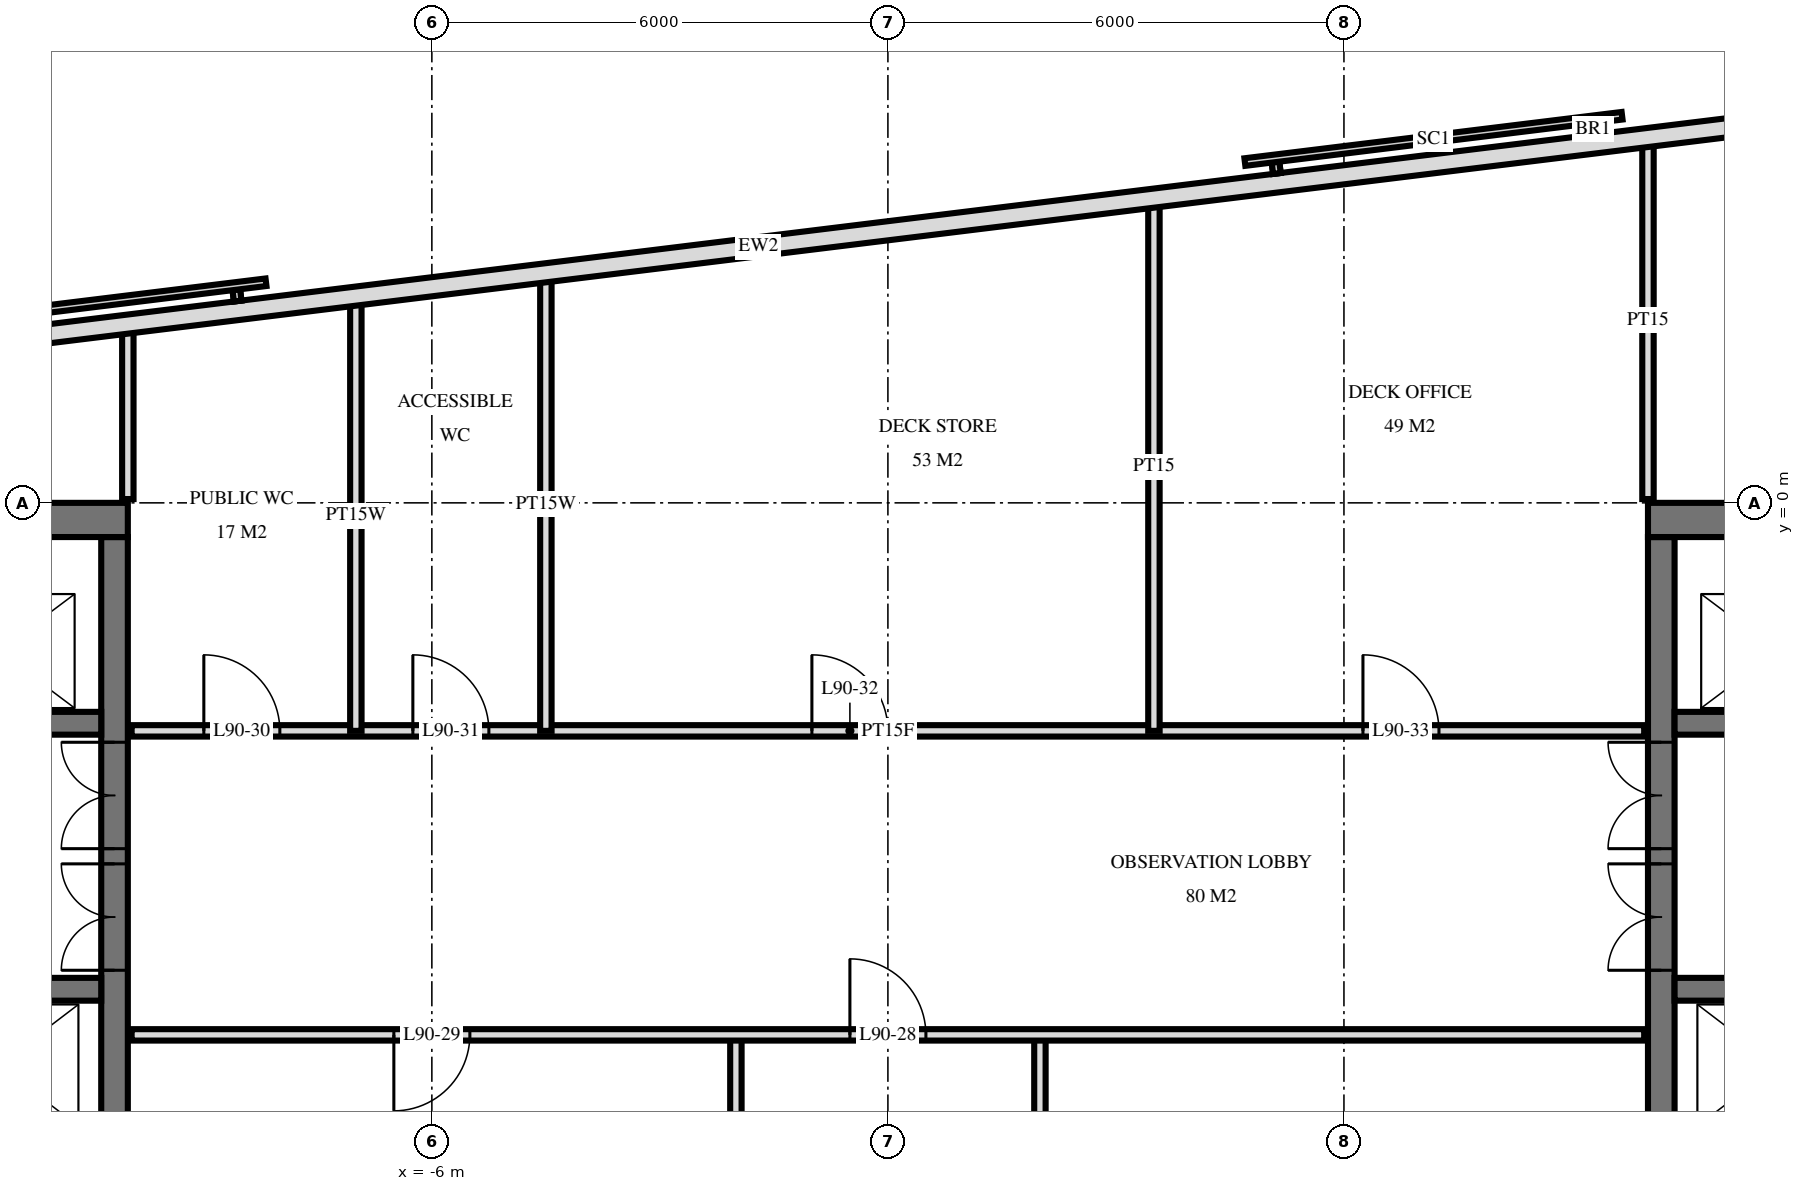
"""IFC4 building model, lengths in metres.
Left out: names, types, materials, properties, quantities, classifications, styles, units other than length and angle.
Written with IfcOpenShell. Run it as: python <this file> out.ifc"""

import sys

from ifc_helpers import new_model, si_unit, direction, frame, frame_2d, origin, place, context, subcontext, project, spatial, rectangle, extrude, element, fill, save


model = new_model("IFC4")
c1 = context("Model", 3, precision=1e-05, world=origin(), true_north=direction((0.0, 1.0)))
c2 = subcontext(c1, "Body", "Model", "MODEL_VIEW")
j1 = project(units=[si_unit("LENGTHUNIT", "METRE"), si_unit("PLANEANGLEUNIT", "RADIAN")], contexts=[c1])
p1 = place(None, origin())
s1 = spatial("IfcSite", under=j1, at=p1, CompositionType="ELEMENT")
p2 = place(p1, origin())
s2 = spatial("IfcBuilding", under=s1, at=p2, CompositionType="ELEMENT")
p3 = place(p2, frame((0.0, 0.0, 342.6)))
s3 = spatial("IfcBuildingStorey", under=s2, at=p3, CompositionType="ELEMENT", Elevation=342.6)
p4 = place(p3, frame((-19.5, -0.225, 0.0), z_axis=(0.0, 0.0, 1.0), x_axis=(1.0, 0.0, 0.0)))
e1 = element("IfcWall", 1, at=p4, inside=s3, PredefinedType="SHEAR", context=c2, shape_type="SweptSolid", body=[
    extrude(rectangle(XDim=9.5, YDim=0.45, at=frame_2d((4.75, 0.0))), origin(), (0.0, 0.0, 1.0), 4.0),
])
p5 = place(p3, frame((-10.175, -14.55, 0.0), z_axis=(0.0, 0.0, 1.0), x_axis=(0.0, 1.0, 0.0)))
e2 = element("IfcWall", 2, at=p5, inside=s3, PredefinedType="SHEAR", context=c2, shape_type="SweptSolid", body=[
    extrude(rectangle(XDim=14.1, YDim=0.35, at=frame_2d((7.05, 0.0))), origin(), (0.0, 0.0, 1.0), 4.0),
])
p6 = place(p5, frame((8.4, 0.0, 0.0)))
e3 = element("IfcOpeningElement", 3, at=p6, cuts=e2, PredefinedType="OPENING", context=c2, shape_type="SweptSolid", body=[
    extrude(rectangle(XDim=1.4, YDim=2.4, at=frame_2d((0.7, 1.2))), frame((0.0, 0.185, 0.0), z_axis=(0.0, -1.0, 0.0), x_axis=(1.0, 0.0, 0.0)), (0.0, 0.0, 1.0), 0.37),
])
p7 = place(p5, frame((10.0, 0.0, 0.0)))
e4 = element("IfcOpeningElement", 4, at=p7, cuts=e2, PredefinedType="OPENING", context=c2, shape_type="SweptSolid", body=[
    extrude(rectangle(XDim=1.4, YDim=2.4, at=frame_2d((0.7, 1.2))), frame((0.0, 0.185, 0.0), z_axis=(0.0, -1.0, 0.0), x_axis=(1.0, 0.0, 0.0)), (0.0, 0.0, 1.0), 0.37),
])
p8 = place(p5, frame((4.0, 0.0, 0.0)))
e5 = element("IfcOpeningElement", 5, at=p8, cuts=e2, PredefinedType="OPENING", context=c2, shape_type="SweptSolid", body=[
    extrude(rectangle(XDim=1.2, YDim=2.1, at=frame_2d((0.6, 1.05))), frame((0.0, 0.185, 0.0), z_axis=(0.0, -1.0, 0.0), x_axis=(1.0, 0.0, 0.0)), (0.0, 0.0, 1.0), 0.37),
])
p9 = place(p3, frame((-19.05, -2.9, 0.0), z_axis=(0.0, 0.0, 1.0), x_axis=(1.0, 0.0, 0.0)))
e6 = element("IfcWall", 6, at=p9, inside=s3, PredefinedType="SHEAR", context=c2, shape_type="SweptSolid", body=[
    extrude(rectangle(XDim=8.7, YDim=0.3, at=frame_2d((4.35, 0.0))), origin(), (0.0, 0.0, 1.0), 4.0),
])
p10 = place(p9, frame((6.8, 0.0, 0.0)))
e7 = element("IfcOpeningElement", 7, at=p10, cuts=e6, PredefinedType="OPENING", context=c2, shape_type="SweptSolid", body=[
    extrude(rectangle(XDim=1.1, YDim=2.1, at=frame_2d((0.55, 1.05))), frame((0.0, 0.16, 0.0), z_axis=(0.0, -1.0, 0.0), x_axis=(1.0, 0.0, 0.0)), (0.0, 0.0, 1.0), 0.32),
])
p11 = place(p9, frame((3.8, 0.0, 0.0)))
e8 = element("IfcOpeningElement", 8, at=p11, cuts=e6, PredefinedType="OPENING", context=c2, shape_type="SweptSolid", body=[
    extrude(rectangle(XDim=1.1, YDim=2.1, at=frame_2d((0.55, 1.05))), frame((0.0, 0.16, 0.0), z_axis=(0.0, -1.0, 0.0), x_axis=(1.0, 0.0, 0.0)), (0.0, 0.0, 1.0), 0.32),
])
p12 = place(p9, frame((1.863, 0.0, 0.0)))
e9 = element("IfcOpeningElement", 9, at=p12, cuts=e6, PredefinedType="OPENING", context=c2, shape_type="SweptSolid", body=[
    extrude(rectangle(XDim=0.9, YDim=2.1, at=frame_2d((0.45, 1.05))), frame((0.0, 0.16, 0.0), z_axis=(0.0, -1.0, 0.0), x_axis=(1.0, 0.0, 0.0)), (0.0, 0.0, 1.0), 0.32),
])
p13 = place(p9, frame((0.438, 0.0, 0.0)))
e10 = element("IfcOpeningElement", 10, at=p13, cuts=e6, PredefinedType="OPENING", context=c2, shape_type="SweptSolid", body=[
    extrude(rectangle(XDim=0.9, YDim=2.1, at=frame_2d((0.45, 1.05))), frame((0.0, 0.16, 0.0), z_axis=(0.0, -1.0, 0.0), x_axis=(1.0, 0.0, 0.0)), (0.0, 0.0, 1.0), 0.32),
])
p14 = place(p3, frame((-19.05, -6.4, 0.0), z_axis=(0.0, 0.0, 1.0), x_axis=(1.0, 0.0, 0.0)))
e11 = element("IfcWall", 11, at=p14, inside=s3, PredefinedType="SHEAR", context=c2, shape_type="SweptSolid", body=[
    extrude(rectangle(XDim=8.7, YDim=0.3, at=frame_2d((4.35, 0.0))), origin(), (0.0, 0.0, 1.0), 4.0),
])
p15 = place(p14, frame((6.8, 0.0, 0.0)))
e12 = element("IfcOpeningElement", 12, at=p15, cuts=e11, PredefinedType="OPENING", context=c2, shape_type="SweptSolid", body=[
    extrude(rectangle(XDim=1.1, YDim=2.1, at=frame_2d((0.55, 1.05))), frame((0.0, 0.16, 0.0), z_axis=(0.0, -1.0, 0.0), x_axis=(1.0, 0.0, 0.0)), (0.0, 0.0, 1.0), 0.32),
])
p16 = place(p14, frame((0.8, 0.0, 0.0)))
e13 = element("IfcOpeningElement", 13, at=p16, cuts=e11, PredefinedType="OPENING", context=c2, shape_type="SweptSolid", body=[
    extrude(rectangle(XDim=1.1, YDim=2.1, at=frame_2d((0.55, 1.05))), frame((0.0, 0.16, 0.0), z_axis=(0.0, -1.0, 0.0), x_axis=(1.0, 0.0, 0.0)), (0.0, 0.0, 1.0), 0.32),
])
p17 = place(p3, frame((10.0, -0.225, 0.0), z_axis=(0.0, 0.0, 1.0), x_axis=(1.0, 0.0, 0.0)))
e14 = element("IfcWall", 14, at=p17, inside=s3, PredefinedType="SHEAR", context=c2, shape_type="SweptSolid", body=[
    extrude(rectangle(XDim=9.5, YDim=0.45, at=frame_2d((4.75, 0.0))), origin(), (0.0, 0.0, 1.0), 4.0),
])
p18 = place(p3, frame((10.175, -14.55, 0.0), z_axis=(0.0, 0.0, 1.0), x_axis=(0.0, 1.0, 0.0)))
e15 = element("IfcWall", 15, at=p18, inside=s3, PredefinedType="SHEAR", context=c2, shape_type="SweptSolid", body=[
    extrude(rectangle(XDim=14.1, YDim=0.35, at=frame_2d((7.05, 0.0))), origin(), (0.0, 0.0, 1.0), 4.0),
])
p19 = place(p18, frame((8.4, 0.0, 0.0)))
e16 = element("IfcOpeningElement", 16, at=p19, cuts=e15, PredefinedType="OPENING", context=c2, shape_type="SweptSolid", body=[
    extrude(rectangle(XDim=1.4, YDim=2.4, at=frame_2d((0.7, 1.2))), frame((0.0, 0.185, 0.0), z_axis=(0.0, -1.0, 0.0), x_axis=(1.0, 0.0, 0.0)), (0.0, 0.0, 1.0), 0.37),
])
p20 = place(p18, frame((10.0, 0.0, 0.0)))
e17 = element("IfcOpeningElement", 17, at=p20, cuts=e15, PredefinedType="OPENING", context=c2, shape_type="SweptSolid", body=[
    extrude(rectangle(XDim=1.4, YDim=2.4, at=frame_2d((0.7, 1.2))), frame((0.0, 0.185, 0.0), z_axis=(0.0, -1.0, 0.0), x_axis=(1.0, 0.0, 0.0)), (0.0, 0.0, 1.0), 0.37),
])
p21 = place(p18, frame((4.0, 0.0, 0.0)))
e18 = element("IfcOpeningElement", 18, at=p21, cuts=e15, PredefinedType="OPENING", context=c2, shape_type="SweptSolid", body=[
    extrude(rectangle(XDim=1.2, YDim=2.1, at=frame_2d((0.6, 1.05))), frame((0.0, 0.185, 0.0), z_axis=(0.0, -1.0, 0.0), x_axis=(1.0, 0.0, 0.0)), (0.0, 0.0, 1.0), 0.37),
])
p22 = place(p3, frame((10.35, -2.9, 0.0), z_axis=(0.0, 0.0, 1.0), x_axis=(1.0, 0.0, 0.0)))
e19 = element("IfcWall", 19, at=p22, inside=s3, PredefinedType="SHEAR", context=c2, shape_type="SweptSolid", body=[
    extrude(rectangle(XDim=8.7, YDim=0.3, at=frame_2d((4.35, 0.0))), origin(), (0.0, 0.0, 1.0), 4.0),
])
p23 = place(p22, frame((0.8, 0.0, 0.0)))
e20 = element("IfcOpeningElement", 20, at=p23, cuts=e19, PredefinedType="OPENING", context=c2, shape_type="SweptSolid", body=[
    extrude(rectangle(XDim=1.1, YDim=2.1, at=frame_2d((0.55, 1.05))), frame((0.0, 0.16, 0.0), z_axis=(0.0, -1.0, 0.0), x_axis=(1.0, 0.0, 0.0)), (0.0, 0.0, 1.0), 0.32),
])
p24 = place(p22, frame((3.8, 0.0, 0.0)))
e21 = element("IfcOpeningElement", 21, at=p24, cuts=e19, PredefinedType="OPENING", context=c2, shape_type="SweptSolid", body=[
    extrude(rectangle(XDim=1.1, YDim=2.1, at=frame_2d((0.55, 1.05))), frame((0.0, 0.16, 0.0), z_axis=(0.0, -1.0, 0.0), x_axis=(1.0, 0.0, 0.0)), (0.0, 0.0, 1.0), 0.32),
])
p25 = place(p22, frame((5.938, 0.0, 0.0)))
e22 = element("IfcOpeningElement", 22, at=p25, cuts=e19, PredefinedType="OPENING", context=c2, shape_type="SweptSolid", body=[
    extrude(rectangle(XDim=0.9, YDim=2.1, at=frame_2d((0.45, 1.05))), frame((0.0, 0.16, 0.0), z_axis=(0.0, -1.0, 0.0), x_axis=(1.0, 0.0, 0.0)), (0.0, 0.0, 1.0), 0.32),
])
p26 = place(p22, frame((7.363, 0.0, 0.0)))
e23 = element("IfcOpeningElement", 23, at=p26, cuts=e19, PredefinedType="OPENING", context=c2, shape_type="SweptSolid", body=[
    extrude(rectangle(XDim=0.9, YDim=2.1, at=frame_2d((0.45, 1.05))), frame((0.0, 0.16, 0.0), z_axis=(0.0, -1.0, 0.0), x_axis=(1.0, 0.0, 0.0)), (0.0, 0.0, 1.0), 0.32),
])
p27 = place(p3, frame((10.35, -6.4, 0.0), z_axis=(0.0, 0.0, 1.0), x_axis=(1.0, 0.0, 0.0)))
e24 = element("IfcWall", 24, at=p27, inside=s3, PredefinedType="SHEAR", context=c2, shape_type="SweptSolid", body=[
    extrude(rectangle(XDim=8.7, YDim=0.3, at=frame_2d((4.35, 0.0))), origin(), (0.0, 0.0, 1.0), 4.0),
])
p28 = place(p27, frame((0.8, 0.0, 0.0)))
e25 = element("IfcOpeningElement", 25, at=p28, cuts=e24, PredefinedType="OPENING", context=c2, shape_type="SweptSolid", body=[
    extrude(rectangle(XDim=1.1, YDim=2.1, at=frame_2d((0.55, 1.05))), frame((0.0, 0.16, 0.0), z_axis=(0.0, -1.0, 0.0), x_axis=(1.0, 0.0, 0.0)), (0.0, 0.0, 1.0), 0.32),
])
p29 = place(p27, frame((6.8, 0.0, 0.0)))
e26 = element("IfcOpeningElement", 26, at=p29, cuts=e24, PredefinedType="OPENING", context=c2, shape_type="SweptSolid", body=[
    extrude(rectangle(XDim=1.1, YDim=2.1, at=frame_2d((0.55, 1.05))), frame((0.0, 0.16, 0.0), z_axis=(0.0, -1.0, 0.0), x_axis=(1.0, 0.0, 0.0)), (0.0, 0.0, 1.0), 0.32),
])
p30 = place(p3, frame((16.138, 5.561, 0.0), z_axis=(0.0, 0.0, 1.0), x_axis=(-0.992546726876, -0.121864658405, 0.0)))
e27 = element("IfcWall", 27, at=p30, inside=s3, PredefinedType="SOLIDWALL", context=c2, shape_type="SweptSolid", body=[
    extrude(rectangle(XDim=35.951, YDim=0.25, at=frame_2d((17.975, 0.0))), origin(), (0.0, 0.0, 1.0), 3.72),
])
p31 = place(p3, frame((10.0, 0.05, 0.0), z_axis=(0.0, 0.0, 1.0), x_axis=(0.0, 1.0, 0.0)))
e28 = element("IfcWall", 28, at=p31, inside=s3, PredefinedType="PARTITIONING", context=c2, shape_type="SweptSolid", body=[
    extrude(rectangle(XDim=4.702, YDim=0.15, at=frame_2d((2.351, 0.0))), origin(), (0.0, 0.0, 1.0), 3.72),
])
p32 = place(p3, frame((3.5, -3.0, 0.0), z_axis=(0.0, 0.0, 1.0), x_axis=(0.0, 1.0, 0.0)))
e29 = element("IfcWall", 29, at=p32, inside=s3, PredefinedType="PARTITIONING", context=c2, shape_type="SweptSolid", body=[
    extrude(rectangle(XDim=6.954, YDim=0.15, at=frame_2d((3.477, 0.0))), origin(), (0.0, 0.0, 1.0), 3.72),
])
for number, where, z_axis, x_axis in (
    (30, (2.0, -11.0, 0.0), (0.0, 0.0, 1.0), (0.0, 1.0, 0.0)),
    (31, (-2.0, -11.0, 0.0), (0.0, 0.0, 1.0), (0.0, 1.0, 0.0)),
):
    element("IfcWall", number, at=place(p3, frame(where, z_axis=z_axis, x_axis=x_axis)), inside=s3, PredefinedType="PARTITIONING", context=c2, shape_type="SweptSolid", body=[
        extrude(rectangle(XDim=4.0, YDim=0.15, at=frame_2d((2.0, 0.0))), origin(), (0.0, 0.0, 1.0), 3.72),
    ])
p33 = place(p3, frame((-4.5, -3.0, 0.0), z_axis=(0.0, 0.0, 1.0), x_axis=(0.0, 1.0, 0.0)))
e32 = element("IfcWall", 32, at=p33, inside=s3, PredefinedType="PLUMBINGWALL", context=c2, shape_type="SweptSolid", body=[
    extrude(rectangle(XDim=5.972, YDim=0.15, at=frame_2d((2.986, 0.0))), origin(), (0.0, 0.0, 1.0), 3.72),
])
p34 = place(p3, frame((-7.0, -3.0, 0.0), z_axis=(0.0, 0.0, 1.0), x_axis=(0.0, 1.0, 0.0)))
e33 = element("IfcWall", 33, at=p34, inside=s3, PredefinedType="PLUMBINGWALL", context=c2, shape_type="SweptSolid", body=[
    extrude(rectangle(XDim=5.665, YDim=0.15, at=frame_2d((2.833, 0.0))), origin(), (0.0, 0.0, 1.0), 3.72),
])
p35 = place(p3, frame((-10.0, 0.05, 0.0), z_axis=(0.0, 0.0, 1.0), x_axis=(0.0, 1.0, 0.0)))
e34 = element("IfcWall", 34, at=p35, inside=s3, PredefinedType="PLUMBINGWALL", context=c2, shape_type="SweptSolid", body=[
    extrude(rectangle(XDim=2.247, YDim=0.15, at=frame_2d((1.123, 0.0))), origin(), (0.0, 0.0, 1.0), 3.72),
])
p36 = place(p3, frame((-9.95, -7.0, 0.0), z_axis=(0.0, 0.0, 1.0), x_axis=(1.0, 0.0, 0.0)))
e35 = element("IfcWall", 35, at=p36, inside=s3, PredefinedType="PARTITIONING", context=c2, shape_type="SweptSolid", body=[
    extrude(rectangle(XDim=19.9, YDim=0.15, at=frame_2d((9.95, 0.0))), origin(), (0.0, 0.0, 1.0), 3.72),
])
p37 = place(p36, frame((9.45, 0.0, 0.0)))
e36 = element("IfcOpeningElement", 36, at=p37, cuts=e35, PredefinedType="OPENING", context=c2, shape_type="SweptSolid", body=[
    extrude(rectangle(XDim=1.0, YDim=2.1, at=frame_2d((0.5, 1.05))), frame((0.0, 0.085, 0.0), z_axis=(0.0, -1.0, 0.0), x_axis=(1.0, 0.0, 0.0)), (0.0, 0.0, 1.0), 0.17),
])
p38 = place(p36, frame((3.45, 0.0, 0.0)))
e37 = element("IfcOpeningElement", 37, at=p38, cuts=e35, PredefinedType="OPENING", context=c2, shape_type="SweptSolid", body=[
    extrude(rectangle(XDim=1.0, YDim=2.1, at=frame_2d((0.5, 1.05))), frame((0.0, 0.085, 0.0), z_axis=(0.0, -1.0, 0.0), x_axis=(1.0, 0.0, 0.0)), (0.0, 0.0, 1.0), 0.17),
])
p39 = place(p3, frame((-9.95, -3.0, 0.0), z_axis=(0.0, 0.0, 1.0), x_axis=(1.0, 0.0, 0.0)))
e38 = element("IfcWall", 38, at=p39, inside=s3, PredefinedType="PARTITIONING", context=c2, shape_type="SweptSolid", body=[
    extrude(rectangle(XDim=19.9, YDim=0.15, at=frame_2d((9.95, 0.0))), origin(), (0.0, 0.0, 1.0), 3.72),
])
p40 = place(p39, frame((0.95, 0.0, 0.0)))
e39 = element("IfcOpeningElement", 39, at=p40, cuts=e38, PredefinedType="OPENING", context=c2, shape_type="SweptSolid", body=[
    extrude(rectangle(XDim=1.0, YDim=2.1, at=frame_2d((0.5, 1.05))), frame((0.0, 0.085, 0.0), z_axis=(0.0, -1.0, 0.0), x_axis=(1.0, 0.0, 0.0)), (0.0, 0.0, 1.0), 0.17),
])
p41 = place(p39, frame((3.7, 0.0, 0.0)))
e40 = element("IfcOpeningElement", 40, at=p41, cuts=e38, PredefinedType="OPENING", context=c2, shape_type="SweptSolid", body=[
    extrude(rectangle(XDim=1.0, YDim=2.1, at=frame_2d((0.5, 1.05))), frame((0.0, 0.085, 0.0), z_axis=(0.0, -1.0, 0.0), x_axis=(1.0, 0.0, 0.0)), (0.0, 0.0, 1.0), 0.17),
])
p42 = place(p39, frame((8.95, 0.0, 0.0)))
e41 = element("IfcOpeningElement", 41, at=p42, cuts=e38, PredefinedType="OPENING", context=c2, shape_type="SweptSolid", body=[
    extrude(rectangle(XDim=1.0, YDim=2.1, at=frame_2d((0.5, 1.05))), frame((0.0, 0.085, 0.0), z_axis=(0.0, -1.0, 0.0), x_axis=(1.0, 0.0, 0.0)), (0.0, 0.0, 1.0), 0.17),
])
p43 = place(p39, frame((16.2, 0.0, 0.0)))
e42 = element("IfcOpeningElement", 42, at=p43, cuts=e38, PredefinedType="OPENING", context=c2, shape_type="SweptSolid", body=[
    extrude(rectangle(XDim=1.0, YDim=2.1, at=frame_2d((0.5, 1.05))), frame((0.0, 0.085, 0.0), z_axis=(0.0, -1.0, 0.0), x_axis=(1.0, 0.0, 0.0)), (0.0, 0.0, 1.0), 0.17),
])
p44 = place(p6, origin())
e43 = element("IfcDoor", 43, at=p44, inside=s3, OperationType="DOUBLE_DOOR_SINGLE_SWING", PredefinedType="DOOR", context=c2, shape_type="SweptSolid", body=[
    extrude(rectangle(XDim=1.4, YDim=2.4, at=frame_2d((0.7, 1.2))), frame((0.0, 0.025, 0.0), z_axis=(0.0, -1.0, 0.0), x_axis=(1.0, 0.0, 0.0)), (0.0, 0.0, 1.0), 0.05),
])
fill(e3, e43)
p45 = place(p7, origin())
e44 = element("IfcDoor", 44, at=p45, inside=s3, OperationType="DOUBLE_DOOR_SINGLE_SWING", PredefinedType="DOOR", context=c2, shape_type="SweptSolid", body=[
    extrude(rectangle(XDim=1.4, YDim=2.4, at=frame_2d((0.7, 1.2))), frame((0.0, 0.025, 0.0), z_axis=(0.0, -1.0, 0.0), x_axis=(1.0, 0.0, 0.0)), (0.0, 0.0, 1.0), 0.05),
])
fill(e4, e44)
p46 = place(p19, origin())
e45 = element("IfcDoor", 45, at=p46, inside=s3, OperationType="DOUBLE_DOOR_SINGLE_SWING", PredefinedType="DOOR", context=c2, shape_type="SweptSolid", body=[
    extrude(rectangle(XDim=1.4, YDim=2.4, at=frame_2d((0.7, 1.2))), frame((0.0, 0.025, 0.0), z_axis=(0.0, -1.0, 0.0), x_axis=(1.0, 0.0, 0.0)), (0.0, 0.0, 1.0), 0.05),
])
fill(e16, e45)
p47 = place(p20, origin())
e46 = element("IfcDoor", 46, at=p47, inside=s3, OperationType="DOUBLE_DOOR_SINGLE_SWING", PredefinedType="DOOR", context=c2, shape_type="SweptSolid", body=[
    extrude(rectangle(XDim=1.4, YDim=2.4, at=frame_2d((0.7, 1.2))), frame((0.0, 0.025, 0.0), z_axis=(0.0, -1.0, 0.0), x_axis=(1.0, 0.0, 0.0)), (0.0, 0.0, 1.0), 0.05),
])
fill(e17, e46)
p48 = place(p37, origin())
e47 = element("IfcDoor", 47, at=p48, inside=s3, OperationType="SINGLE_SWING_RIGHT", PredefinedType="DOOR", context=c2, shape_type="SweptSolid", body=[
    extrude(rectangle(XDim=1.0, YDim=2.1, at=frame_2d((0.5, 1.05))), frame((0.0, 0.025, 0.0), z_axis=(0.0, -1.0, 0.0), x_axis=(1.0, 0.0, 0.0)), (0.0, 0.0, 1.0), 0.05),
])
fill(e36, e47)
p49 = place(p38, frame((0.5, 0.0, 0.0), z_axis=(0.0, 0.0, 1.0), x_axis=(-1.0, 0.0, 0.0)))
e48 = element("IfcDoor", 48, at=p49, inside=s3, OperationType="SINGLE_SWING_LEFT", PredefinedType="DOOR", context=c2, shape_type="SweptSolid", body=[
    extrude(rectangle(XDim=1.0, YDim=2.1, at=frame_2d((0.0, 1.05))), frame((0.0, -0.025, 0.0), z_axis=(0.0, 1.0, 0.0), x_axis=(-1.0, 0.0, 0.0)), (0.0, 0.0, 1.0), 0.05),
])
fill(e37, e48)
p50 = place(p40, origin())
e49 = element("IfcDoor", 49, at=p50, inside=s3, OperationType="SINGLE_SWING_RIGHT", PredefinedType="DOOR", context=c2, shape_type="SweptSolid", body=[
    extrude(rectangle(XDim=1.0, YDim=2.1, at=frame_2d((0.5, 1.05))), frame((0.0, 0.025, 0.0), z_axis=(0.0, -1.0, 0.0), x_axis=(1.0, 0.0, 0.0)), (0.0, 0.0, 1.0), 0.05),
])
fill(e39, e49)
p51 = place(p41, origin())
e50 = element("IfcDoor", 50, at=p51, inside=s3, OperationType="SINGLE_SWING_RIGHT", PredefinedType="DOOR", context=c2, shape_type="SweptSolid", body=[
    extrude(rectangle(XDim=1.0, YDim=2.1, at=frame_2d((0.5, 1.05))), frame((0.0, 0.025, 0.0), z_axis=(0.0, -1.0, 0.0), x_axis=(1.0, 0.0, 0.0)), (0.0, 0.0, 1.0), 0.05),
])
fill(e40, e50)
p52 = place(p42, origin())
e51 = element("IfcDoor", 51, at=p52, inside=s3, OperationType="SINGLE_SWING_RIGHT", PredefinedType="DOOR", context=c2, shape_type="SweptSolid", body=[
    extrude(rectangle(XDim=1.0, YDim=2.1, at=frame_2d((0.5, 1.05))), frame((0.0, 0.025, 0.0), z_axis=(0.0, -1.0, 0.0), x_axis=(1.0, 0.0, 0.0)), (0.0, 0.0, 1.0), 0.05),
])
fill(e41, e51)
p53 = place(p43, origin())
e52 = element("IfcDoor", 52, at=p53, inside=s3, OperationType="SINGLE_SWING_RIGHT", PredefinedType="DOOR", context=c2, shape_type="SweptSolid", body=[
    extrude(rectangle(XDim=1.0, YDim=2.1, at=frame_2d((0.5, 1.05))), frame((0.0, 0.025, 0.0), z_axis=(0.0, -1.0, 0.0), x_axis=(1.0, 0.0, 0.0)), (0.0, 0.0, 1.0), 0.05),
])
fill(e42, e52)
save(model, sys.argv[1])
